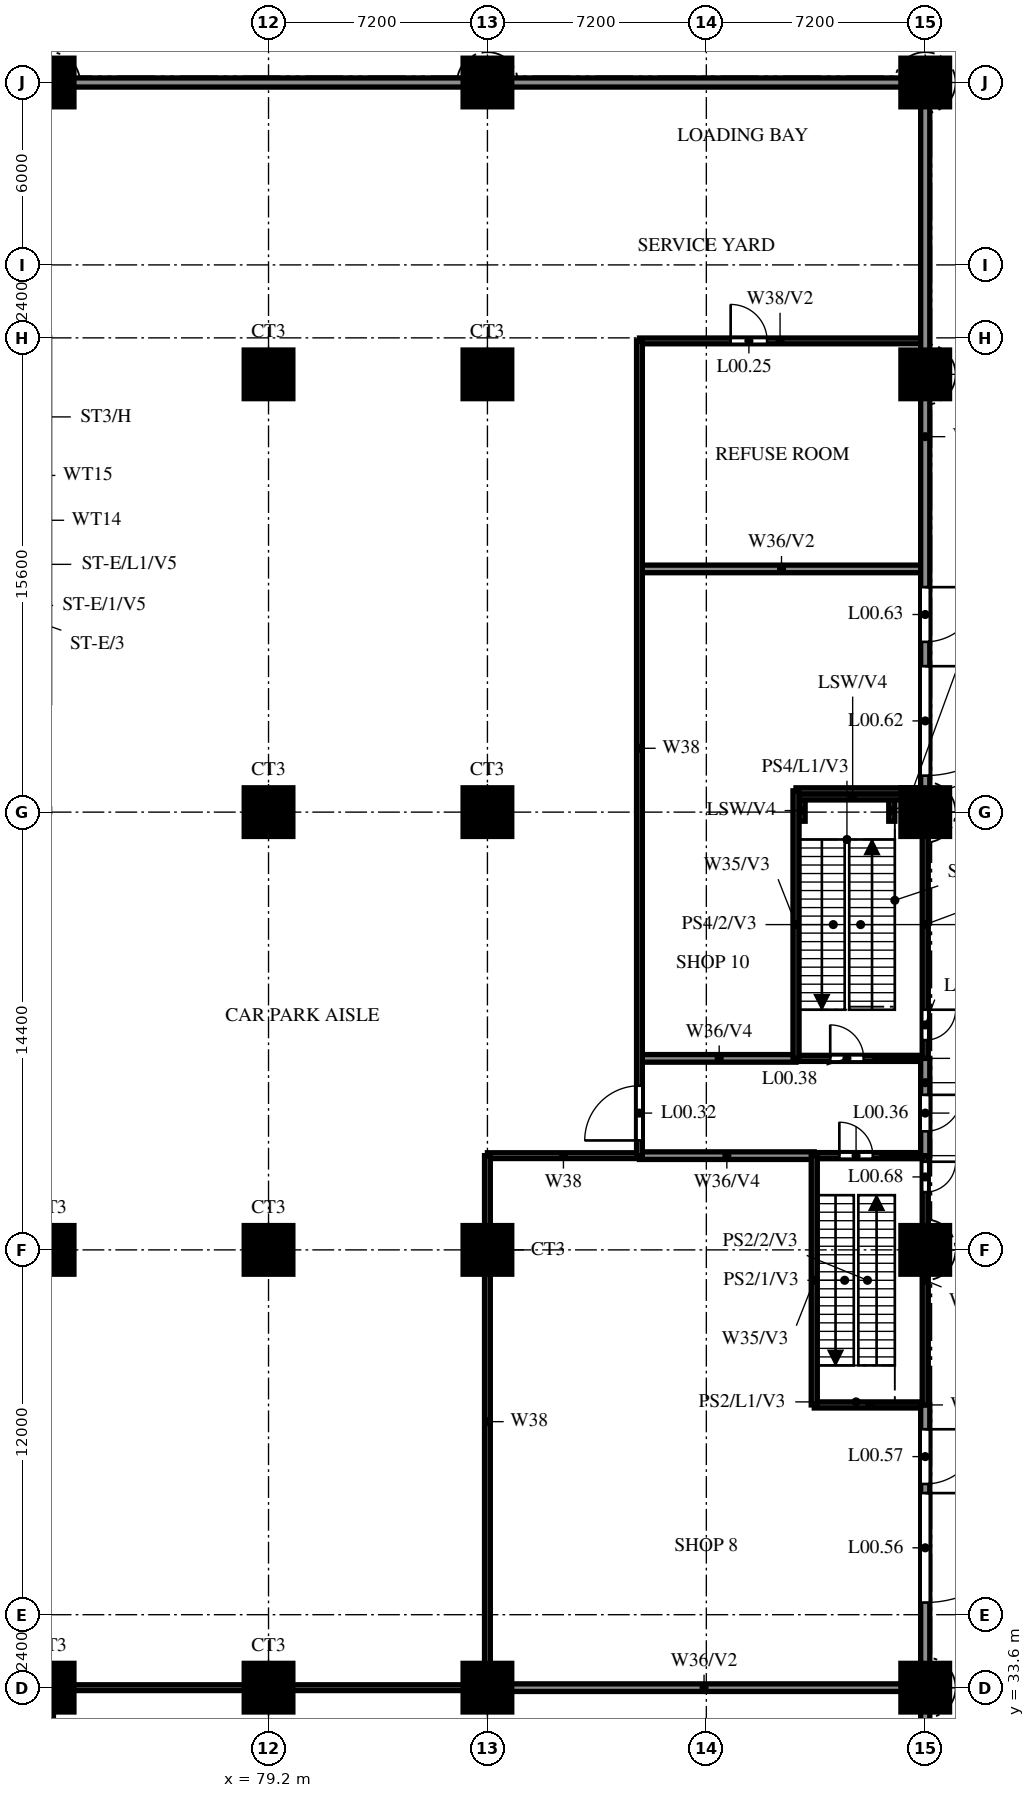
"""IFC4 building model, lengths in metres.
Left out: names, types, materials, properties, quantities, classifications, styles, units other than length and angle.
Written with IfcOpenShell. Run it as: python <this file> out.ifc"""

import sys

from ifc_helpers import new_model, si_unit, direction, frame, frame_2d, origin, origin_2d, place, context, subcontext, project, spatial, rectangle, circle, extrude, source, transform, mapped, element, fill, save


model = new_model("IFC4")
c1 = context("Model", 3, precision=1e-05, world=origin(), true_north=direction((0.0, 1.0)))
c2 = subcontext(c1, "Body", "Model", "MODEL_VIEW")
j1 = project(units=[si_unit("LENGTHUNIT", "METRE"), si_unit("PLANEANGLEUNIT", "RADIAN")], contexts=[c1])
p1 = place(None, origin())
s1 = spatial("IfcSite", under=j1, at=p1, CompositionType="ELEMENT")
p2 = place(p1, origin())
s2 = spatial("IfcBuilding", under=s1, at=p2, CompositionType="ELEMENT")
p3 = place(p2, origin())
s3 = spatial("IfcBuildingStorey", under=s2, at=p3, CompositionType="ELEMENT", Elevation=0.0)
m1 = source(origin(), c2, "Body", "SweptSolid", [
    extrude(circle(Radius=0.8, at=origin_2d()), origin(), (0.0, 0.0, 1.0), 7.4),
])
for number, where, z_axis, x_axis in (
    (1, (72.0, 33.6, 0.0), (0.0, 0.0, 1.0), (1.0, 0.0, 0.0)),
    (2, (79.2, 33.6, 0.0), (0.0, 0.0, 1.0), (1.0, 0.0, 0.0)),
    (3, (86.4, 33.6, 0.0), (0.0, 0.0, 1.0), (1.0, 0.0, 0.0)),
    (4, (100.8, 33.6, 0.0), (0.0, 0.0, 1.0), (1.0, 0.0, 0.0)),
    (5, (72.0, 48.0, 0.0), (0.0, 0.0, 1.0), (1.0, 0.0, 0.0)),
    (6, (79.2, 48.0, 0.0), (0.0, 0.0, 1.0), (1.0, 0.0, 0.0)),
    (7, (86.4, 48.0, 0.0), (0.0, 0.0, 1.0), (1.0, 0.0, 0.0)),
    (8, (100.8, 48.0, 0.0), (0.0, 0.0, 1.0), (1.0, 0.0, 0.0)),
    (9, (79.2, 62.4, 0.0), (0.0, 0.0, 1.0), (1.0, 0.0, 0.0)),
    (10, (86.4, 62.4, 0.0), (0.0, 0.0, 1.0), (1.0, 0.0, 0.0)),
    (11, (100.8, 62.4, 0.0), (0.0, 0.0, 1.0), (1.0, 0.0, 0.0)),
    (12, (79.2, 76.8, 0.0), (0.0, 0.0, 1.0), (1.0, 0.0, 0.0)),
    (13, (86.4, 76.8, 0.0), (0.0, 0.0, 1.0), (1.0, 0.0, 0.0)),
    (14, (100.8, 76.8, 0.0), (0.0, 0.0, 1.0), (1.0, 0.0, 0.0)),
    (15, (72.0, 86.4, 0.0), (0.0, 0.0, 1.0), (1.0, 0.0, 0.0)),
    (16, (86.4, 86.4, 0.0), (0.0, 0.0, 1.0), (1.0, 0.0, 0.0)),
    (17, (100.8, 86.4, 0.0), (0.0, 0.0, 1.0), (1.0, 0.0, 0.0)),
):
    element("IfcColumn", number, at=place(p3, frame(where, z_axis=z_axis, x_axis=x_axis)), inside=s3, PredefinedType="COLUMN", context=c2, shape_type="MappedRepresentation", body=[
        mapped(m1, transform((0.0, 0.0, 0.0))),
    ])
for number, where, z_axis, x_axis in (
    (18, (96.75, 62.1, 0.0), (0.0, 0.0, 1.0), (0.0, 1.0, 0.0)),
    (19, (99.7, 62.1, 0.0), (0.0, 0.0, 1.0), (0.0, 1.0, 0.0)),
):
    element("IfcWall", number, at=place(p3, frame(where, z_axis=z_axis, x_axis=x_axis)), inside=s3, PredefinedType="SOLIDWALL", context=c2, shape_type="SweptSolid", body=[
        extrude(rectangle(XDim=0.7, YDim=0.2, at=frame_2d((0.35, 0.0))), origin(), (0.0, 0.0, 1.0), 3.7),
    ])
p4 = place(p3, frame((96.65, 62.9, 0.0), z_axis=(0.0, 0.0, 1.0), x_axis=(1.0, 0.0, 0.0)))
e20 = element("IfcWall", 20, at=p4, inside=s3, PredefinedType="SOLIDWALL", context=c2, shape_type="SweptSolid", body=[
    extrude(rectangle(XDim=3.526, YDim=0.2, at=frame_2d((1.763, 0.0))), origin(), (0.0, 0.0, 1.0), 3.7),
])
p5 = place(p3, frame((72.0, 33.6, 0.0), z_axis=(0.0, 0.0, 1.0), x_axis=(1.0, 0.0, 0.0)))
e21 = element("IfcWall", 21, at=p5, inside=s3, PredefinedType="PARTITIONING", context=c2, shape_type="SweptSolid", body=[
    extrude(rectangle(XDim=14.4, YDim=0.19, at=frame_2d((7.2, 0.0))), origin(), (0.0, 0.0, 1.0), 6.5),
])
p6 = place(p3, frame((86.4, 33.6, 0.0), z_axis=(0.0, 0.0, 1.0), x_axis=(1.0, 0.0, 0.0)))
e22 = element("IfcWall", 22, at=p6, inside=s3, PredefinedType="SOLIDWALL", context=c2, shape_type="SweptSolid", body=[
    extrude(rectangle(XDim=14.25, YDim=0.25, at=frame_2d((7.125, 0.0))), origin(), (0.0, 0.0, 1.0), 6.2),
])
p7 = place(p3, frame((97.15, 42.9, 0.0), z_axis=(0.0, 0.0, 1.0), x_axis=(1.0, 0.0, 0.0)))
e23 = element("IfcWall", 23, at=p7, inside=s3, PredefinedType="SOLIDWALL", context=c2, shape_type="SweptSolid", body=[
    extrude(rectangle(XDim=3.65, YDim=0.2, at=frame_2d((1.825, 0.0))), origin(), (0.0, 0.0, 1.0), 7.4),
])
p8 = place(p3, frame((86.4, 51.1, 0.0), z_axis=(0.0, 0.0, 1.0), x_axis=(1.0, 0.0, 0.0)))
e24 = element("IfcWall", 24, at=p8, inside=s3, PredefinedType="PARTITIONING", context=c2, shape_type="SweptSolid", body=[
    extrude(rectangle(XDim=5.0, YDim=0.19, at=frame_2d((2.5, 0.0))), origin(), (0.0, 0.0, 1.0), 6.2),
])
p9 = place(p3, frame((91.4, 51.1, 0.0), z_axis=(0.0, 0.0, 1.0), x_axis=(1.0, 0.0, 0.0)))
e25 = element("IfcWall", 25, at=p9, inside=s3, PredefinedType="SOLIDWALL", context=c2, shape_type="SweptSolid", body=[
    extrude(rectangle(XDim=5.75, YDim=0.25, at=frame_2d((2.875, 0.0))), origin(), (0.0, 0.0, 1.0), 7.4),
])
p10 = place(p3, frame((97.15, 51.1, 0.0), z_axis=(0.0, 0.0, 1.0), x_axis=(1.0, 0.0, 0.0)))
e26 = element("IfcWall", 26, at=p10, inside=s3, PredefinedType="SOLIDWALL", context=c2, shape_type="SweptSolid", body=[
    extrude(rectangle(XDim=3.65, YDim=0.2, at=frame_2d((1.825, 0.0))), origin(), (0.0, 0.0, 1.0), 7.4),
])
p11 = place(p10, frame((0.825, 0.0, 0.0)))
e27 = element("IfcOpeningElement", 27, at=p11, cuts=e26, PredefinedType="OPENING", context=c2, shape_type="SweptSolid", body=[
    extrude(rectangle(XDim=1.1, YDim=2.1, at=frame_2d((0.55, 1.05))), frame((0.0, 0.11, 0.0), z_axis=(0.0, -1.0, 0.0), x_axis=(1.0, 0.0, 0.0)), (0.0, 0.0, 1.0), 0.22),
])
p12 = place(p3, frame((91.495, 54.3, 0.0), z_axis=(0.0, 0.0, 1.0), x_axis=(1.0, 0.0, 0.0)))
e28 = element("IfcWall", 28, at=p12, inside=s3, PredefinedType="SOLIDWALL", context=c2, shape_type="SweptSolid", body=[
    extrude(rectangle(XDim=5.055, YDim=0.25, at=frame_2d((2.527, 0.0))), origin(), (0.0, 0.0, 1.0), 7.4),
])
p13 = place(p3, frame((96.55, 54.3, 0.0), z_axis=(0.0, 0.0, 1.0), x_axis=(1.0, 0.0, 0.0)))
e29 = element("IfcWall", 29, at=p13, inside=s3, PredefinedType="SOLIDWALL", context=c2, shape_type="SweptSolid", body=[
    extrude(rectangle(XDim=4.25, YDim=0.2, at=frame_2d((2.125, 0.0))), origin(), (0.0, 0.0, 1.0), 7.4),
])
p14 = place(p13, frame((1.125, 0.0, 0.0)))
e30 = element("IfcOpeningElement", 30, at=p14, cuts=e29, PredefinedType="OPENING", context=c2, shape_type="SweptSolid", body=[
    extrude(rectangle(XDim=1.1, YDim=2.1, at=frame_2d((0.55, 1.05))), frame((0.0, 0.11, 0.0), z_axis=(0.0, -1.0, 0.0), x_axis=(1.0, 0.0, 0.0)), (0.0, 0.0, 1.0), 0.22),
])
p15 = place(p3, frame((96.55, 63.1, 0.0), z_axis=(0.0, 0.0, 1.0), x_axis=(1.0, 0.0, 0.0)))
e31 = element("IfcWall", 31, at=p15, inside=s3, PredefinedType="SOLIDWALL", context=c2, shape_type="SweptSolid", body=[
    extrude(rectangle(XDim=4.25, YDim=0.2, at=frame_2d((2.125, 0.0))), origin(), (0.0, 0.0, 1.0), 7.4),
])
p16 = place(p3, frame((91.495, 70.4, 0.0), z_axis=(0.0, 0.0, 1.0), x_axis=(1.0, 0.0, 0.0)))
e32 = element("IfcWall", 32, at=p16, inside=s3, PredefinedType="SOLIDWALL", context=c2, shape_type="SweptSolid", body=[
    extrude(rectangle(XDim=9.155, YDim=0.25, at=frame_2d((4.577, 0.0))), origin(), (0.0, 0.0, 1.0), 6.2),
])
p17 = place(p3, frame((91.4, 77.9, 0.0), z_axis=(0.0, 0.0, 1.0), x_axis=(1.0, 0.0, 0.0)))
e33 = element("IfcWall", 33, at=p17, inside=s3, PredefinedType="PARTITIONING", context=c2, shape_type="SweptSolid", body=[
    extrude(rectangle(XDim=9.25, YDim=0.19, at=frame_2d((4.625, 0.0))), origin(), (0.0, 0.0, 1.0), 7.4),
])
p18 = place(p17, frame((3.0, 0.0, 0.0)))
e34 = element("IfcOpeningElement", 34, at=p18, cuts=e33, PredefinedType="OPENING", context=c2, shape_type="SweptSolid", body=[
    extrude(rectangle(XDim=1.2, YDim=2.1, at=frame_2d((0.6, 1.05))), frame((0.0, 0.105, 0.0), z_axis=(0.0, -1.0, 0.0), x_axis=(1.0, 0.0, 0.0)), (0.0, 0.0, 1.0), 0.21),
])
p19 = place(p3, frame((0.0, 86.4, 0.0), z_axis=(0.0, 0.0, 1.0), x_axis=(1.0, 0.0, 0.0)))
e35 = element("IfcWall", 35, at=p19, inside=s3, PredefinedType="SOLIDWALL", context=c2, shape_type="SweptSolid", body=[
    extrude(rectangle(XDim=100.8, YDim=0.3, at=frame_2d((50.4, 0.0))), origin(), (0.0, 0.0, 1.0), 7.4),
])
p20 = place(p19, frame((16.5, 0.0, 0.0)))
e36 = element("IfcOpeningElement", 36, at=p20, cuts=e35, PredefinedType="OPENING", context=c2, shape_type="SweptSolid", body=[
    extrude(rectangle(XDim=6.0, YDim=3.0, at=frame_2d((3.0, 1.5))), frame((0.0, 0.16, 0.0), z_axis=(0.0, -1.0, 0.0), x_axis=(1.0, 0.0, 0.0)), (0.0, 0.0, 1.0), 0.32),
])
p21 = place(p3, frame((72.0, 21.6, 0.0), z_axis=(0.0, 0.0, 1.0), x_axis=(0.0, 1.0, 0.0)))
e37 = element("IfcWall", 37, at=p21, inside=s3, PredefinedType="SOLIDWALL", context=c2, shape_type="SweptSolid", body=[
    extrude(rectangle(XDim=12.0, YDim=0.25, at=frame_2d((6.0, 0.0))), origin(), (0.0, 0.0, 1.0), 6.2),
])
p22 = place(p3, frame((86.4, 33.6, 0.0), z_axis=(0.0, 0.0, 1.0), x_axis=(0.0, 1.0, 0.0)))
e38 = element("IfcWall", 38, at=p22, inside=s3, PredefinedType="PARTITIONING", context=c2, shape_type="SweptSolid", body=[
    extrude(rectangle(XDim=17.5, YDim=0.19, at=frame_2d((8.75, 0.0))), origin(), (0.0, 0.0, 1.0), 6.2),
])
p23 = place(p3, frame((91.4, 51.1, 0.0), z_axis=(0.0, 0.0, 1.0), x_axis=(0.0, 1.0, 0.0)))
e39 = element("IfcWall", 39, at=p23, inside=s3, PredefinedType="PARTITIONING", context=c2, shape_type="SweptSolid", body=[
    extrude(rectangle(XDim=26.8, YDim=0.19, at=frame_2d((13.4, 0.0))), origin(), (0.0, 0.0, 1.0), 6.2),
])
p24 = place(p23, frame((0.5, 0.0, 0.0)))
e40 = element("IfcOpeningElement", 40, at=p24, cuts=e39, PredefinedType="OPENING", context=c2, shape_type="SweptSolid", body=[
    extrude(rectangle(XDim=1.8, YDim=2.1, at=frame_2d((0.9, 1.05))), frame((0.0, 0.105, 0.0), z_axis=(0.0, -1.0, 0.0), x_axis=(1.0, 0.0, 0.0)), (0.0, 0.0, 1.0), 0.21),
])
p25 = place(p3, frame((96.55, 54.3, 0.0), z_axis=(0.0, 0.0, 1.0), x_axis=(0.0, 1.0, 0.0)))
e41 = element("IfcWall", 41, at=p25, inside=s3, PredefinedType="SOLIDWALL", context=c2, shape_type="SweptSolid", body=[
    extrude(rectangle(XDim=8.8, YDim=0.2, at=frame_2d((4.4, 0.0))), origin(), (0.0, 0.0, 1.0), 7.4),
])
p26 = place(p3, frame((97.15, 42.9, 0.0), z_axis=(0.0, 0.0, 1.0), x_axis=(0.0, 1.0, 0.0)))
e42 = element("IfcWall", 42, at=p26, inside=s3, PredefinedType="SOLIDWALL", context=c2, shape_type="SweptSolid", body=[
    extrude(rectangle(XDim=8.2, YDim=0.2, at=frame_2d((4.1, 0.0))), origin(), (0.0, 0.0, 1.0), 7.4),
])
p27 = place(p3, frame((100.8, 42.9, 0.0), z_axis=(0.0, 0.0, 1.0), x_axis=(0.0, -1.0, 0.0)))
e43 = element("IfcWall", 43, at=p27, inside=s3, PredefinedType="SOLIDWALL", context=c2, shape_type="SweptSolid", body=[
    extrude(rectangle(XDim=35.2, YDim=0.3, at=frame_2d((17.6, 0.0))), origin(), (0.0, 0.0, 1.0), 7.4),
])
p28 = place(p27, frame((14.7, 0.0, 0.0)))
e44 = element("IfcOpeningElement", 44, at=p28, cuts=e43, PredefinedType="OPENING", context=c2, shape_type="SweptSolid", body=[
    extrude(rectangle(XDim=3.6, YDim=3.0, at=frame_2d((1.8, 1.5))), frame((0.0, 0.16, 0.0), z_axis=(0.0, -1.0, 0.0), x_axis=(1.0, 0.0, 0.0)), (0.0, 0.0, 1.0), 0.32),
])
p29 = place(p27, frame((11.4, 0.0, 0.0)))
e45 = element("IfcOpeningElement", 45, at=p29, cuts=e43, PredefinedType="OPENING", context=c2, shape_type="SweptSolid", body=[
    extrude(rectangle(XDim=1.8, YDim=2.1, at=frame_2d((0.9, 1.05))), frame((0.0, 0.16, 0.0), z_axis=(0.0, -1.0, 0.0), x_axis=(1.0, 0.0, 0.0)), (0.0, 0.0, 1.0), 0.32),
])
p30 = place(p27, frame((28.8, 0.0, 0.0)))
e46 = element("IfcOpeningElement", 46, at=p30, cuts=e43, PredefinedType="OPENING", context=c2, shape_type="SweptSolid", body=[
    extrude(rectangle(XDim=2.4, YDim=2.1, at=frame_2d((1.2, 1.05))), frame((0.0, 0.16, 0.0), z_axis=(0.0, -1.0, 0.0), x_axis=(1.0, 0.0, 0.0)), (0.0, 0.0, 1.0), 0.32),
])
p31 = place(p27, frame((25.8, 0.0, 0.0)))
e47 = element("IfcOpeningElement", 47, at=p31, cuts=e43, PredefinedType="OPENING", context=c2, shape_type="SweptSolid", body=[
    extrude(rectangle(XDim=2.4, YDim=2.1, at=frame_2d((1.2, 1.05))), frame((0.0, 0.16, 0.0), z_axis=(0.0, -1.0, 0.0), x_axis=(1.0, 0.0, 0.0)), (0.0, 0.0, 1.0), 0.32),
])
p32 = place(p27, frame((2.9, 0.0, 0.0)))
e48 = element("IfcOpeningElement", 48, at=p32, cuts=e43, PredefinedType="OPENING", context=c2, shape_type="SweptSolid", body=[
    extrude(rectangle(XDim=3.6, YDim=3.0, at=frame_2d((1.8, 1.5))), frame((0.0, 0.16, 0.0), z_axis=(0.0, -1.0, 0.0), x_axis=(1.0, 0.0, 0.0)), (0.0, 0.0, 1.0), 0.32),
])
p33 = place(p27, frame((0.8, 0.0, 0.0)))
e49 = element("IfcOpeningElement", 49, at=p33, cuts=e43, PredefinedType="OPENING", context=c2, shape_type="SweptSolid", body=[
    extrude(rectangle(XDim=1.8, YDim=2.1, at=frame_2d((0.9, 1.05))), frame((0.0, 0.16, 0.0), z_axis=(0.0, -1.0, 0.0), x_axis=(1.0, 0.0, 0.0)), (0.0, 0.0, 1.0), 0.32),
])
p34 = place(p3, frame((100.8, 54.3, 0.0), z_axis=(0.0, 0.0, 1.0), x_axis=(0.0, -1.0, 0.0)))
e50 = element("IfcWall", 50, at=p34, inside=s3, PredefinedType="SOLIDWALL", context=c2, shape_type="SweptSolid", body=[
    extrude(rectangle(XDim=3.2, YDim=0.3, at=frame_2d((1.6, 0.0))), origin(), (0.0, 0.0, 1.0), 7.4),
])
p35 = place(p34, frame((1.2, 0.0, 0.0)))
e51 = element("IfcOpeningElement", 51, at=p35, cuts=e50, PredefinedType="OPENING", context=c2, shape_type="SweptSolid", body=[
    extrude(rectangle(XDim=1.2, YDim=2.1, at=frame_2d((0.6, 1.05))), frame((0.0, 0.16, 0.0), z_axis=(0.0, -1.0, 0.0), x_axis=(1.0, 0.0, 0.0)), (0.0, 0.0, 1.0), 0.32),
])
p36 = place(p3, frame((100.8, 86.4, 0.0), z_axis=(0.0, 0.0, 1.0), x_axis=(0.0, -1.0, 0.0)))
e52 = element("IfcWall", 52, at=p36, inside=s3, PredefinedType="SOLIDWALL", context=c2, shape_type="SweptSolid", body=[
    extrude(rectangle(XDim=23.3, YDim=0.3, at=frame_2d((11.65, 0.0))), origin(), (0.0, 0.0, 1.0), 7.4),
])
p37 = place(p36, frame((19.2, 0.0, 0.0)))
e53 = element("IfcOpeningElement", 53, at=p37, cuts=e52, PredefinedType="OPENING", context=c2, shape_type="SweptSolid", body=[
    extrude(rectangle(XDim=3.6, YDim=3.0, at=frame_2d((1.8, 1.5))), frame((0.0, 0.16, 0.0), z_axis=(0.0, -1.0, 0.0), x_axis=(1.0, 0.0, 0.0)), (0.0, 0.0, 1.0), 0.32),
])
p38 = place(p36, frame((16.6, 0.0, 0.0)))
e54 = element("IfcOpeningElement", 54, at=p38, cuts=e52, PredefinedType="OPENING", context=c2, shape_type="SweptSolid", body=[
    extrude(rectangle(XDim=1.8, YDim=2.1, at=frame_2d((0.9, 1.05))), frame((0.0, 0.16, 0.0), z_axis=(0.0, -1.0, 0.0), x_axis=(1.0, 0.0, 0.0)), (0.0, 0.0, 1.0), 0.32),
])
p39 = place(p3, frame((100.8, 51.1, 0.0), z_axis=(0.0, 0.0, 1.0), x_axis=(0.0, -1.0, 0.0)))
e55 = element("IfcWall", 55, at=p39, inside=s3, PredefinedType="SOLIDWALL", context=c2, shape_type="SweptSolid", body=[
    extrude(rectangle(XDim=8.2, YDim=0.2, at=frame_2d((4.1, 0.0))), origin(), (0.0, 0.0, 1.0), 7.4),
])
p40 = place(p39, frame((0.2, 0.0, 0.0)))
e56 = element("IfcOpeningElement", 56, at=p40, cuts=e55, PredefinedType="OPENING", context=c2, shape_type="SweptSolid", body=[
    extrude(rectangle(XDim=1.0, YDim=2.1, at=frame_2d((0.5, 1.05))), frame((0.0, 0.11, 0.0), z_axis=(0.0, -1.0, 0.0), x_axis=(1.0, 0.0, 0.0)), (0.0, 0.0, 1.0), 0.22),
])
p41 = place(p3, frame((100.8, 63.1, 0.0), z_axis=(0.0, 0.0, 1.0), x_axis=(0.0, -1.0, 0.0)))
e57 = element("IfcWall", 57, at=p41, inside=s3, PredefinedType="SOLIDWALL", context=c2, shape_type="SweptSolid", body=[
    extrude(rectangle(XDim=8.8, YDim=0.2, at=frame_2d((4.4, 0.0))), origin(), (0.0, 0.0, 1.0), 7.4),
])
p42 = place(p41, frame((7.2, 0.0, 0.0)))
e58 = element("IfcOpeningElement", 58, at=p42, cuts=e57, PredefinedType="OPENING", context=c2, shape_type="SweptSolid", body=[
    extrude(rectangle(XDim=1.0, YDim=2.1, at=frame_2d((0.5, 1.05))), frame((0.0, 0.11, 0.0), z_axis=(0.0, -1.0, 0.0), x_axis=(1.0, 0.0, 0.0)), (0.0, 0.0, 1.0), 0.22),
])
p43 = place(p18, origin())
e59 = element("IfcDoor", 59, at=p43, inside=s3, OperationType="SINGLE_SWING_LEFT", PredefinedType="DOOR", context=c2, shape_type="SweptSolid", body=[
    extrude(rectangle(XDim=1.2, YDim=2.1, at=frame_2d((0.6, 1.05))), frame((0.0, 0.025, 0.0), z_axis=(0.0, -1.0, 0.0), x_axis=(1.0, 0.0, 0.0)), (0.0, 0.0, 1.0), 0.05),
])
fill(e34, e59)
p44 = place(p24, origin())
e60 = element("IfcDoor", 60, at=p44, inside=s3, OperationType="DOUBLE_DOOR_SINGLE_SWING", PredefinedType="DOOR", context=c2, shape_type="SweptSolid", body=[
    extrude(rectangle(XDim=1.8, YDim=2.1, at=frame_2d((0.9, 1.05))), frame((0.0, 0.025, 0.0), z_axis=(0.0, -1.0, 0.0), x_axis=(1.0, 0.0, 0.0)), (0.0, 0.0, 1.0), 0.05),
])
fill(e40, e60)
p45 = place(p11, origin())
e61 = element("IfcDoor", 61, at=p45, inside=s3, OperationType="SINGLE_SWING_LEFT", PredefinedType="DOOR", context=c2, shape_type="SweptSolid", body=[
    extrude(rectangle(XDim=1.1, YDim=2.1, at=frame_2d((0.55, 1.05))), frame((0.0, 0.025, 0.0), z_axis=(0.0, -1.0, 0.0), x_axis=(1.0, 0.0, 0.0)), (0.0, 0.0, 1.0), 0.05),
])
fill(e27, e61)
p46 = place(p14, origin())
e62 = element("IfcDoor", 62, at=p46, inside=s3, OperationType="SINGLE_SWING_LEFT", PredefinedType="DOOR", context=c2, shape_type="SweptSolid", body=[
    extrude(rectangle(XDim=1.1, YDim=2.1, at=frame_2d((0.55, 1.05))), frame((0.0, 0.025, 0.0), z_axis=(0.0, -1.0, 0.0), x_axis=(1.0, 0.0, 0.0)), (0.0, 0.0, 1.0), 0.05),
])
fill(e30, e62)
p47 = place(p32, origin())
e63 = element("IfcDoor", 63, at=p47, inside=s3, OperationType="SINGLE_SWING_RIGHT", PredefinedType="DOOR", context=c2, shape_type="SweptSolid", body=[
    extrude(rectangle(XDim=3.6, YDim=3.0, at=frame_2d((1.8, 1.5))), frame((0.0, 0.025, 0.0), z_axis=(0.0, -1.0, 0.0), x_axis=(1.0, 0.0, 0.0)), (0.0, 0.0, 1.0), 0.05),
])
fill(e48, e63)
p48 = place(p33, origin())
e64 = element("IfcDoor", 64, at=p48, inside=s3, OperationType="DOUBLE_DOOR_SINGLE_SWING", PredefinedType="DOOR", context=c2, shape_type="SweptSolid", body=[
    extrude(rectangle(XDim=1.8, YDim=2.1, at=frame_2d((0.9, 1.05))), frame((0.0, 0.025, 0.0), z_axis=(0.0, -1.0, 0.0), x_axis=(1.0, 0.0, 0.0)), (0.0, 0.0, 1.0), 0.05),
])
fill(e49, e64)
p49 = place(p35, origin())
e65 = element("IfcDoor", 65, at=p49, inside=s3, OperationType="SINGLE_SWING_RIGHT", PredefinedType="DOOR", context=c2, shape_type="SweptSolid", body=[
    extrude(rectangle(XDim=1.2, YDim=2.1, at=frame_2d((0.6, 1.05))), frame((0.0, 0.025, 0.0), z_axis=(0.0, -1.0, 0.0), x_axis=(1.0, 0.0, 0.0)), (0.0, 0.0, 1.0), 0.05),
])
fill(e51, e65)
p50 = place(p37, origin())
e66 = element("IfcDoor", 66, at=p50, inside=s3, OperationType="SINGLE_SWING_LEFT", PredefinedType="DOOR", context=c2, shape_type="SweptSolid", body=[
    extrude(rectangle(XDim=3.6, YDim=3.0, at=frame_2d((1.8, 1.5))), frame((0.0, 0.025, 0.0), z_axis=(0.0, -1.0, 0.0), x_axis=(1.0, 0.0, 0.0)), (0.0, 0.0, 1.0), 0.05),
])
fill(e53, e66)
p51 = place(p38, origin())
e67 = element("IfcDoor", 67, at=p51, inside=s3, OperationType="DOUBLE_DOOR_SINGLE_SWING", PredefinedType="DOOR", context=c2, shape_type="SweptSolid", body=[
    extrude(rectangle(XDim=1.8, YDim=2.1, at=frame_2d((0.9, 1.05))), frame((0.0, 0.025, 0.0), z_axis=(0.0, -1.0, 0.0), x_axis=(1.0, 0.0, 0.0)), (0.0, 0.0, 1.0), 0.05),
])
fill(e54, e67)
p52 = place(p40, origin())
e68 = element("IfcDoor", 68, at=p52, inside=s3, OperationType="SINGLE_SWING_LEFT", PredefinedType="DOOR", context=c2, shape_type="SweptSolid", body=[
    extrude(rectangle(XDim=1.0, YDim=2.1, at=frame_2d((0.5, 1.05))), frame((0.0, 0.025, 0.0), z_axis=(0.0, -1.0, 0.0), x_axis=(1.0, 0.0, 0.0)), (0.0, 0.0, 1.0), 0.05),
])
fill(e56, e68)
p53 = place(p42, origin())
e69 = element("IfcDoor", 69, at=p53, inside=s3, OperationType="SINGLE_SWING_RIGHT", PredefinedType="DOOR", context=c2, shape_type="SweptSolid", body=[
    extrude(rectangle(XDim=1.0, YDim=2.1, at=frame_2d((0.5, 1.05))), frame((0.0, 0.025, 0.0), z_axis=(0.0, -1.0, 0.0), x_axis=(1.0, 0.0, 0.0)), (0.0, 0.0, 1.0), 0.05),
])
fill(e58, e69)
save(model, sys.argv[1])
